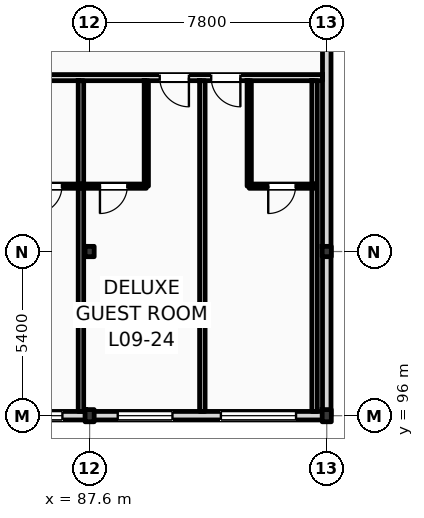
"""IFC4 building model, lengths in metres.
Left out: names, types, materials, properties, quantities, classifications, styles, units other than length and angle.
Written with IfcOpenShell. Run it as: python <this file> out.ifc"""

import sys

from ifc_helpers import new_model, si_unit, direction, frame, frame_2d, origin, origin_2d, place, context, subcontext, project, spatial, rectangle, i_section, extrude, element, fill, save


model = new_model("IFC4")
c1 = context("Model", 3, precision=1e-05, world=origin(), true_north=direction((0.0, 1.0)))
c2 = subcontext(c1, "Body", "Model", "MODEL_VIEW")
j1 = project(units=[si_unit("LENGTHUNIT", "METRE"), si_unit("PLANEANGLEUNIT", "RADIAN")], contexts=[c1])
p1 = place(None, origin())
s1 = spatial("IfcSite", under=j1, at=p1, CompositionType="ELEMENT")
p2 = place(p1, origin())
s2 = spatial("IfcBuilding", under=s1, at=p2, CompositionType="ELEMENT")
p3 = place(p2, frame((0.0, 0.0, 39.0)))
s3 = spatial("IfcBuildingStorey", under=s2, at=p3, CompositionType="ELEMENT", Elevation=39.0)
p4 = place(p3, frame((87.6, 96.0, 0.0), z_axis=(0.0, 0.0, 1.0), x_axis=(1.0, 0.0, 0.0)))
e1 = element("IfcColumn", 1, at=p4, inside=s3, PredefinedType="COLUMN", context=c2, shape_type="SweptSolid", body=[
    extrude(i_section(OverallWidth=0.3, OverallDepth=0.4, WebThickness=0.013, FlangeThickness=0.024, FilletRadius=0.027, at=origin_2d()), origin(), (0.0, 0.0, 1.0), 3.6),
])
p5 = place(p3, frame((87.6, 101.4, 0.0), z_axis=(0.0, 0.0, 1.0), x_axis=(1.0, 0.0, 0.0)))
e2 = element("IfcColumn", 2, at=p5, inside=s3, PredefinedType="COLUMN", context=c2, shape_type="SweptSolid", body=[
    extrude(i_section(OverallWidth=0.3, OverallDepth=0.34, WebThickness=0.012, FlangeThickness=0.021, FilletRadius=0.027, at=origin_2d()), origin(), (0.0, 0.0, 1.0), 3.6),
])
p6 = place(p3, frame((95.4, 96.0, 0.0), z_axis=(0.0, 0.0, 1.0), x_axis=(1.0, 0.0, 0.0)))
e3 = element("IfcColumn", 3, at=p6, inside=s3, PredefinedType="COLUMN", context=c2, shape_type="SweptSolid", body=[
    extrude(i_section(OverallWidth=0.3, OverallDepth=0.4, WebThickness=0.013, FlangeThickness=0.024, FilletRadius=0.027, at=origin_2d()), origin(), (0.0, 0.0, 1.0), 3.6),
])
p7 = place(p3, frame((95.4, 101.4, 0.0), z_axis=(0.0, 0.0, 1.0), x_axis=(1.0, 0.0, 0.0)))
e4 = element("IfcColumn", 4, at=p7, inside=s3, PredefinedType="COLUMN", context=c2, shape_type="SweptSolid", body=[
    extrude(i_section(OverallWidth=0.3, OverallDepth=0.34, WebThickness=0.012, FlangeThickness=0.021, FilletRadius=0.027, at=origin_2d()), origin(), (0.0, 0.0, 1.0), 3.6),
])
p8 = place(p3, frame((95.4, 96.0, 0.0), z_axis=(0.0, 0.0, 1.0), x_axis=(0.0, 1.0, 0.0)))
e5 = element("IfcWall", 5, at=p8, inside=s3, PredefinedType="STANDARD", context=c2, shape_type="SweptSolid", body=[
    extrude(rectangle(XDim=22.0, YDim=0.28, at=frame_2d((11.0, 0.0))), origin(), (0.0, 0.0, 1.0), 3.01),
])
p9 = place(p3, frame((25.2, 96.0, 0.0), z_axis=(0.0, 0.0, 1.0), x_axis=(1.0, 0.0, 0.0)))
e6 = element("IfcWall", 6, at=p9, inside=s3, PredefinedType="STANDARD", context=c2, shape_type="SweptSolid", body=[
    extrude(rectangle(XDim=70.2, YDim=0.28, at=frame_2d((35.1, 0.0))), origin(), (0.0, 0.0, 1.0), 2.92),
])
p10 = place(p9, frame((16.695, 0.0, 0.9)))
e7 = element("IfcOpeningElement", 7, at=p10, cuts=e6, PredefinedType="OPENING", context=c2, shape_type="SweptSolid", body=[
    extrude(rectangle(XDim=2.25, YDim=1.84, at=frame_2d((1.125, 0.92))), frame((0.0, 0.15, 0.0), z_axis=(0.0, -1.0, 0.0), x_axis=(1.0, 0.0, 0.0)), (0.0, 0.0, 1.0), 0.3),
])
p11 = place(p9, frame((20.748, 0.0, 0.9)))
e8 = element("IfcOpeningElement", 8, at=p11, cuts=e6, PredefinedType="OPENING", context=c2, shape_type="SweptSolid", body=[
    extrude(rectangle(XDim=1.8, YDim=1.84, at=frame_2d((0.9, 0.92))), frame((0.0, 0.15, 0.0), z_axis=(0.0, -1.0, 0.0), x_axis=(1.0, 0.0, 0.0)), (0.0, 0.0, 1.0), 0.3),
])
p12 = place(p9, frame((25.963, 0.0, 0.9)))
e9 = element("IfcOpeningElement", 9, at=p12, cuts=e6, PredefinedType="OPENING", context=c2, shape_type="SweptSolid", body=[
    extrude(rectangle(XDim=2.55, YDim=1.84, at=frame_2d((1.275, 0.92))), frame((0.0, 0.15, 0.0), z_axis=(0.0, -1.0, 0.0), x_axis=(1.0, 0.0, 0.0)), (0.0, 0.0, 1.0), 0.3),
])
p13 = place(p9, frame((32.177, 0.0, 0.9)))
e10 = element("IfcOpeningElement", 10, at=p13, cuts=e6, PredefinedType="OPENING", context=c2, shape_type="SweptSolid", body=[
    extrude(rectangle(XDim=1.35, YDim=1.84, at=frame_2d((0.675, 0.92))), frame((0.0, 0.15, 0.0), z_axis=(0.0, -1.0, 0.0), x_axis=(1.0, 0.0, 0.0)), (0.0, 0.0, 1.0), 0.3),
])
p14 = place(p9, frame((35.267, 0.0, 0.9)))
e11 = element("IfcOpeningElement", 11, at=p14, cuts=e6, PredefinedType="OPENING", context=c2, shape_type="SweptSolid", body=[
    extrude(rectangle(XDim=2.85, YDim=1.84, at=frame_2d((1.425, 0.92))), frame((0.0, 0.15, 0.0), z_axis=(0.0, -1.0, 0.0), x_axis=(1.0, 0.0, 0.0)), (0.0, 0.0, 1.0), 0.3),
])
p15 = place(p9, frame((55.56, 0.0, 0.9)))
e12 = element("IfcOpeningElement", 12, at=p15, cuts=e6, PredefinedType="OPENING", context=c2, shape_type="SweptSolid", body=[
    extrude(rectangle(XDim=1.8, YDim=1.84, at=frame_2d((0.9, 0.92))), frame((0.0, 0.15, 0.0), z_axis=(0.0, -1.0, 0.0), x_axis=(1.0, 0.0, 0.0)), (0.0, 0.0, 1.0), 0.3),
])
p16 = place(p9, frame((59.093, 0.0, 0.9)))
e13 = element("IfcOpeningElement", 13, at=p16, cuts=e6, PredefinedType="OPENING", context=c2, shape_type="SweptSolid", body=[
    extrude(rectangle(XDim=2.412, YDim=1.84, at=frame_2d((1.206, 0.92))), frame((0.0, 0.15, 0.0), z_axis=(0.0, -1.0, 0.0), x_axis=(1.0, 0.0, 0.0)), (0.0, 0.0, 1.0), 0.3),
])
p17 = place(p9, frame((63.325, 0.0, 0.9)))
e14 = element("IfcOpeningElement", 14, at=p17, cuts=e6, PredefinedType="OPENING", context=c2, shape_type="SweptSolid", body=[
    extrude(rectangle(XDim=1.8, YDim=1.84, at=frame_2d((0.9, 0.92))), frame((0.0, 0.15, 0.0), z_axis=(0.0, -1.0, 0.0), x_axis=(1.0, 0.0, 0.0)), (0.0, 0.0, 1.0), 0.3),
])
p18 = place(p9, frame((66.718, 0.0, 0.9)))
e15 = element("IfcOpeningElement", 15, at=p18, cuts=e6, PredefinedType="OPENING", context=c2, shape_type="SweptSolid", body=[
    extrude(rectangle(XDim=2.472, YDim=1.84, at=frame_2d((1.236, 0.92))), frame((0.0, 0.15, 0.0), z_axis=(0.0, -1.0, 0.0), x_axis=(1.0, 0.0, 0.0)), (0.0, 0.0, 1.0), 0.3),
])
p19 = place(p3, frame((79.76, 107.12, 0.0), z_axis=(0.0, 0.0, 1.0), x_axis=(1.0, 0.0, 0.0)))
e16 = element("IfcWall", 16, at=p19, inside=s3, PredefinedType="PARTITIONING", context=c2, shape_type="SweptSolid", body=[
    extrude(rectangle(XDim=15.5, YDim=0.2, at=frame_2d((7.75, 0.0))), origin(), (0.0, 0.0, 1.0), 3.38),
])
p20 = place(p19, frame((2.552, 0.0, 0.0)))
e17 = element("IfcOpeningElement", 17, at=p20, cuts=e16, PredefinedType="OPENING", context=c2, shape_type="SweptSolid", body=[
    extrude(rectangle(XDim=0.96, YDim=2.2, at=frame_2d((0.48, 1.1))), frame((0.0, 0.11, 0.0), z_axis=(0.0, -1.0, 0.0), x_axis=(1.0, 0.0, 0.0)), (0.0, 0.0, 1.0), 0.22),
])
p21 = place(p19, frame((4.184, 0.0, 0.0)))
e18 = element("IfcOpeningElement", 18, at=p21, cuts=e16, PredefinedType="OPENING", context=c2, shape_type="SweptSolid", body=[
    extrude(rectangle(XDim=0.96, YDim=2.2, at=frame_2d((0.48, 1.1))), frame((0.0, 0.11, 0.0), z_axis=(0.0, -1.0, 0.0), x_axis=(1.0, 0.0, 0.0)), (0.0, 0.0, 1.0), 0.22),
])
p22 = place(p19, frame((10.146, 0.0, 0.0)))
e19 = element("IfcOpeningElement", 19, at=p22, cuts=e16, PredefinedType="OPENING", context=c2, shape_type="SweptSolid", body=[
    extrude(rectangle(XDim=0.96, YDim=2.2, at=frame_2d((0.48, 1.1))), frame((0.0, 0.11, 0.0), z_axis=(0.0, -1.0, 0.0), x_axis=(1.0, 0.0, 0.0)), (0.0, 0.0, 1.0), 0.22),
])
p23 = place(p19, frame((11.839, 0.0, 0.0)))
e20 = element("IfcOpeningElement", 20, at=p23, cuts=e16, PredefinedType="OPENING", context=c2, shape_type="SweptSolid", body=[
    extrude(rectangle(XDim=0.96, YDim=2.2, at=frame_2d((0.48, 1.1))), frame((0.0, 0.11, 0.0), z_axis=(0.0, -1.0, 0.0), x_axis=(1.0, 0.0, 0.0)), (0.0, 0.0, 1.0), 0.22),
])
p24 = place(p3, frame((87.315, 96.14, 0.0), z_axis=(0.0, 0.0, 1.0), x_axis=(0.0, 1.0, 0.0)))
e21 = element("IfcWall", 21, at=p24, inside=s3, PredefinedType="PARTITIONING", context=c2, shape_type="SweptSolid", body=[
    extrude(rectangle(XDim=10.88, YDim=0.18, at=frame_2d((5.44, 0.0))), origin(), (0.0, 0.0, 1.0), 3.38),
])
p25 = place(p3, frame((85.165, 103.55, 0.0), z_axis=(0.0, 0.0, 1.0), x_axis=(1.0, 0.0, 0.0)))
e22 = element("IfcWall", 22, at=p25, inside=s3, PredefinedType="PARTITIONING", context=c2, shape_type="SweptSolid", body=[
    extrude(rectangle(XDim=2.15, YDim=0.14, at=frame_2d((1.075, 0.0))), origin(), (0.0, 0.0, 1.0), 3.38),
])
p26 = place(p25, frame((0.625, 0.0, 0.0)))
e23 = element("IfcOpeningElement", 23, at=p26, cuts=e22, PredefinedType="OPENING", context=c2, shape_type="SweptSolid", body=[
    extrude(rectangle(XDim=0.9, YDim=2.1, at=frame_2d((0.45, 1.05))), frame((0.0, 0.08, 0.0), z_axis=(0.0, -1.0, 0.0), x_axis=(1.0, 0.0, 0.0)), (0.0, 0.0, 1.0), 0.16),
])
p27 = place(p3, frame((91.308, 96.14, 0.0), z_axis=(0.0, 0.0, 1.0), x_axis=(0.0, 1.0, 0.0)))
e24 = element("IfcWall", 24, at=p27, inside=s3, PredefinedType="PARTITIONING", context=c2, shape_type="SweptSolid", body=[
    extrude(rectangle(XDim=10.88, YDim=0.18, at=frame_2d((5.44, 0.0))), origin(), (0.0, 0.0, 1.0), 3.38),
])
p28 = place(p3, frame((89.465, 103.55, 0.0), z_axis=(0.0, 0.0, 1.0), x_axis=(0.0, 1.0, 0.0)))
e25 = element("IfcWall", 25, at=p28, inside=s3, PredefinedType="PARTITIONING", context=c2, shape_type="SweptSolid", body=[
    extrude(rectangle(XDim=3.47, YDim=0.14, at=frame_2d((1.735, 0.0))), origin(), (0.0, 0.0, 1.0), 3.38),
])
p29 = place(p3, frame((87.315, 103.55, 0.0), z_axis=(0.0, 0.0, 1.0), x_axis=(1.0, 0.0, 0.0)))
e26 = element("IfcWall", 26, at=p29, inside=s3, PredefinedType="PARTITIONING", context=c2, shape_type="SweptSolid", body=[
    extrude(rectangle(XDim=2.15, YDim=0.14, at=frame_2d((1.075, 0.0))), origin(), (0.0, 0.0, 1.0), 3.38),
])
p30 = place(p29, frame((0.625, 0.0, 0.0)))
e27 = element("IfcOpeningElement", 27, at=p30, cuts=e26, PredefinedType="OPENING", context=c2, shape_type="SweptSolid", body=[
    extrude(rectangle(XDim=0.9, YDim=2.1, at=frame_2d((0.45, 1.05))), frame((0.0, 0.08, 0.0), z_axis=(0.0, -1.0, 0.0), x_axis=(1.0, 0.0, 0.0)), (0.0, 0.0, 1.0), 0.16),
])
p31 = place(p3, frame((95.0, 96.14, 0.0), z_axis=(0.0, 0.0, 1.0), x_axis=(0.0, 1.0, 0.0)))
e28 = element("IfcWall", 28, at=p31, inside=s3, PredefinedType="PARTITIONING", context=c2, shape_type="SweptSolid", body=[
    extrude(rectangle(XDim=10.88, YDim=0.18, at=frame_2d((5.44, 0.0))), origin(), (0.0, 0.0, 1.0), 3.38),
])
p32 = place(p3, frame((92.85, 103.55, 0.0), z_axis=(0.0, 0.0, 1.0), x_axis=(0.0, 1.0, 0.0)))
e29 = element("IfcWall", 29, at=p32, inside=s3, PredefinedType="PARTITIONING", context=c2, shape_type="SweptSolid", body=[
    extrude(rectangle(XDim=3.47, YDim=0.14, at=frame_2d((1.735, 0.0))), origin(), (0.0, 0.0, 1.0), 3.07),
])
p33 = place(p3, frame((92.85, 103.55, 0.0), z_axis=(0.0, 0.0, 1.0), x_axis=(1.0, 0.0, 0.0)))
e30 = element("IfcWall", 30, at=p33, inside=s3, PredefinedType="PARTITIONING", context=c2, shape_type="SweptSolid", body=[
    extrude(rectangle(XDim=2.15, YDim=0.14, at=frame_2d((1.075, 0.0))), origin(), (0.0, 0.0, 1.0), 3.38),
])
p34 = place(p33, frame((0.625, 0.0, 0.0)))
e31 = element("IfcOpeningElement", 31, at=p34, cuts=e30, PredefinedType="OPENING", context=c2, shape_type="SweptSolid", body=[
    extrude(rectangle(XDim=0.9, YDim=2.1, at=frame_2d((0.45, 1.05))), frame((0.0, 0.08, 0.0), z_axis=(0.0, -1.0, 0.0), x_axis=(1.0, 0.0, 0.0)), (0.0, 0.0, 1.0), 0.16),
])
p35 = place(p16, origin())
e32 = element("IfcWindow", 32, at=p35, inside=s3, PartitioningType="DOUBLE_PANEL_VERTICAL", PredefinedType="WINDOW", context=c2, shape_type="SweptSolid", body=[
    extrude(rectangle(XDim=2.412, YDim=1.84, at=frame_2d((1.206, 0.92))), frame((0.0, 0.03, 0.0), z_axis=(0.0, -1.0, 0.0), x_axis=(1.0, 0.0, 0.0)), (0.0, 0.0, 1.0), 0.06),
])
fill(e13, e32)
p36 = place(p17, origin())
e33 = element("IfcWindow", 33, at=p36, inside=s3, PartitioningType="DOUBLE_PANEL_VERTICAL", PredefinedType="WINDOW", context=c2, shape_type="SweptSolid", body=[
    extrude(rectangle(XDim=1.8, YDim=1.84, at=frame_2d((0.9, 0.92))), frame((0.0, 0.03, 0.0), z_axis=(0.0, -1.0, 0.0), x_axis=(1.0, 0.0, 0.0)), (0.0, 0.0, 1.0), 0.06),
])
fill(e14, e33)
p37 = place(p18, origin())
e34 = element("IfcWindow", 34, at=p37, inside=s3, PartitioningType="DOUBLE_PANEL_VERTICAL", PredefinedType="WINDOW", context=c2, shape_type="SweptSolid", body=[
    extrude(rectangle(XDim=2.472, YDim=1.84, at=frame_2d((1.236, 0.92))), frame((0.0, 0.03, 0.0), z_axis=(0.0, -1.0, 0.0), x_axis=(1.0, 0.0, 0.0)), (0.0, 0.0, 1.0), 0.06),
])
fill(e15, e34)
p38 = place(p26, frame((0.9, 0.0, 0.0), z_axis=(0.0, 0.0, 1.0), x_axis=(-1.0, 0.0, 0.0)))
e35 = element("IfcDoor", 35, at=p38, inside=s3, OperationType="SINGLE_SWING_LEFT", PredefinedType="DOOR", context=c2, shape_type="SweptSolid", body=[
    extrude(rectangle(XDim=0.9, YDim=2.1, at=frame_2d((0.45, 1.05))), frame((0.0, 0.025, 0.0), z_axis=(0.0, -1.0, 0.0), x_axis=(1.0, 0.0, 0.0)), (0.0, 0.0, 1.0), 0.05),
])
fill(e23, e35)
p39 = place(p22, frame((0.96, 0.0, 0.0), z_axis=(0.0, 0.0, 1.0), x_axis=(-1.0, 0.0, 0.0)))
e36 = element("IfcDoor", 36, at=p39, inside=s3, OperationType="SINGLE_SWING_RIGHT", PredefinedType="DOOR", context=c2, shape_type="SweptSolid", body=[
    extrude(rectangle(XDim=0.96, YDim=2.2, at=frame_2d((0.48, 1.1))), frame((0.0, 0.025, 0.0), z_axis=(0.0, -1.0, 0.0), x_axis=(1.0, 0.0, 0.0)), (0.0, 0.0, 1.0), 0.05),
])
fill(e19, e36)
p40 = place(p30, frame((0.9, 0.0, 0.0), z_axis=(0.0, 0.0, 1.0), x_axis=(-1.0, 0.0, 0.0)))
e37 = element("IfcDoor", 37, at=p40, inside=s3, OperationType="SINGLE_SWING_LEFT", PredefinedType="DOOR", context=c2, shape_type="SweptSolid", body=[
    extrude(rectangle(XDim=0.9, YDim=2.1, at=frame_2d((0.45, 1.05))), frame((0.0, 0.025, 0.0), z_axis=(0.0, -1.0, 0.0), x_axis=(1.0, 0.0, 0.0)), (0.0, 0.0, 1.0), 0.05),
])
fill(e27, e37)
p41 = place(p23, frame((0.96, 0.0, 0.0), z_axis=(0.0, 0.0, 1.0), x_axis=(-1.0, 0.0, 0.0)))
e38 = element("IfcDoor", 38, at=p41, inside=s3, OperationType="SINGLE_SWING_RIGHT", PredefinedType="DOOR", context=c2, shape_type="SweptSolid", body=[
    extrude(rectangle(XDim=0.96, YDim=2.2, at=frame_2d((0.48, 1.1))), frame((0.0, 0.025, 0.0), z_axis=(0.0, -1.0, 0.0), x_axis=(1.0, 0.0, 0.0)), (0.0, 0.0, 1.0), 0.05),
])
fill(e20, e38)
p42 = place(p34, frame((0.9, 0.0, 0.0), z_axis=(0.0, 0.0, 1.0), x_axis=(-1.0, 0.0, 0.0)))
e39 = element("IfcDoor", 39, at=p42, inside=s3, OperationType="SINGLE_SWING_LEFT", PredefinedType="DOOR", context=c2, shape_type="SweptSolid", body=[
    extrude(rectangle(XDim=0.9, YDim=2.1, at=frame_2d((0.45, 1.05))), frame((0.0, 0.025, 0.0), z_axis=(0.0, -1.0, 0.0), x_axis=(1.0, 0.0, 0.0)), (0.0, 0.0, 1.0), 0.05),
])
fill(e31, e39)
save(model, sys.argv[1])
